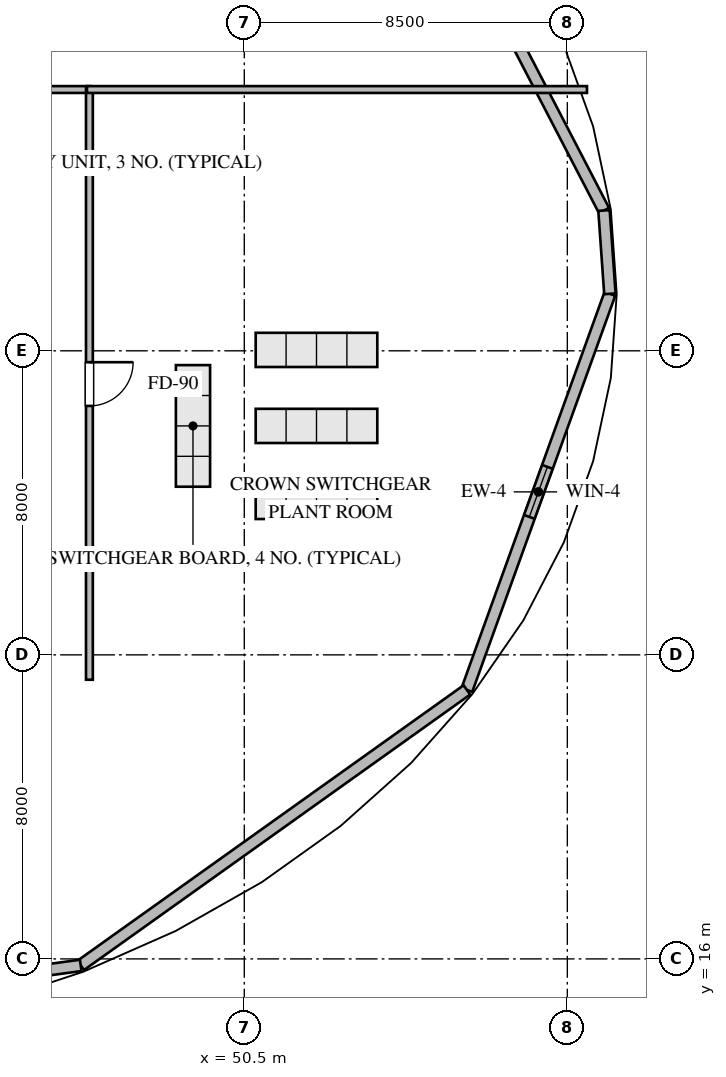
"""IFC4 building model, lengths in metres.
Left out: names, types, materials, properties, quantities, classifications, styles, units other than length and angle.
Written with IfcOpenShell. Run it as: python <this file> out.ifc"""

import sys

from ifc_helpers import new_model, si_unit, direction, frame, frame_2d, origin, place, context, subcontext, project, spatial, rectangle, extrude, element, fill, save


model = new_model("IFC4")
c1 = context("Model", 3, precision=1e-05, world=origin(), true_north=direction((0.0, 1.0)))
c2 = subcontext(c1, "Body", "Model", "MODEL_VIEW")
j1 = project(units=[si_unit("LENGTHUNIT", "METRE"), si_unit("PLANEANGLEUNIT", "RADIAN")], contexts=[c1])
p1 = place(None, origin())
s1 = spatial("IfcSite", under=j1, at=p1, CompositionType="ELEMENT")
p2 = place(p1, origin())
s2 = spatial("IfcBuilding", under=s1, at=p2, CompositionType="ELEMENT")
p3 = place(p2, frame((0.0, 0.0, 296.8)))
s3 = spatial("IfcBuildingStorey", under=s2, at=p3, CompositionType="ELEMENT", Elevation=296.8)
p4 = place(p3, frame((60.12, 33.5, 0.0), z_axis=(0.0, 0.0, 1.0), x_axis=(-0.339587618367, -0.940574425259, 0.0)))
e1 = element("IfcWall", 1, at=p4, inside=s3, PredefinedType="STANDARD", context=c2, shape_type="SweptSolid", body=[
    extrude(rectangle(XDim=11.082, YDim=0.3, at=frame_2d((5.541, 0.0))), origin(), (0.0, 0.0, 1.0), 3.72),
])
p5 = place(p4, frame((4.841, 0.0, 1.2)))
e2 = element("IfcOpeningElement", 2, at=p5, cuts=e1, PredefinedType="OPENING", context=c2, shape_type="SweptSolid", body=[
    extrude(rectangle(XDim=1.4, YDim=1.2, at=frame_2d((0.7, 0.6))), frame((0.0, 0.16, 0.0), z_axis=(0.0, -1.0, 0.0), x_axis=(1.0, 0.0, 0.0)), (0.0, 0.0, 1.0), 0.32),
])
p6 = place(p3, frame((56.357, 23.077, 0.0), z_axis=(0.0, 0.0, 1.0), x_axis=(-0.814111303181, -0.580708865123, 0.0)))
e3 = element("IfcWall", 3, at=p6, inside=s3, PredefinedType="STANDARD", context=c2, shape_type="SweptSolid", body=[
    extrude(rectangle(XDim=12.481, YDim=0.3, at=frame_2d((6.24, 0.0))), origin(), (0.0, 0.0, 1.0), 3.72),
])
p7 = place(p3, frame((46.196, 15.829, 0.0), z_axis=(0.0, 0.0, 1.0), x_axis=(-0.990927056791, -0.134400774248, 0.0)))
e4 = element("IfcWall", 4, at=p7, inside=s3, PredefinedType="STANDARD", context=c2, shape_type="SweptSolid", body=[
    extrude(rectangle(XDim=13.58, YDim=0.3, at=frame_2d((6.79, 0.0))), origin(), (0.0, 0.0, 1.0), 3.72),
])
p8 = place(p7, frame((6.09, 0.0, 1.2)))
e5 = element("IfcOpeningElement", 5, at=p8, cuts=e4, PredefinedType="OPENING", context=c2, shape_type="SweptSolid", body=[
    extrude(rectangle(XDim=1.4, YDim=1.2, at=frame_2d((0.7, 0.6))), frame((0.0, 0.16, 0.0), z_axis=(0.0, -1.0, 0.0), x_axis=(1.0, 0.0, 0.0)), (0.0, 0.0, 1.0), 0.32),
])
p9 = place(p3, frame((54.762, 45.718, 0.0), z_axis=(0.0, 0.0, 1.0), x_axis=(0.460623742834, -0.8875954977, 0.0)))
e6 = element("IfcWall", 6, at=p9, inside=s3, PredefinedType="STANDARD", context=c2, shape_type="SweptSolid", body=[
    extrude(rectangle(XDim=11.296, YDim=0.3, at=frame_2d((5.648, 0.0))), origin(), (0.0, 0.0, 1.0), 3.72),
])
p10 = place(p9, frame((4.948, 0.0, 1.2)))
e7 = element("IfcOpeningElement", 7, at=p10, cuts=e6, PredefinedType="OPENING", context=c2, shape_type="SweptSolid", body=[
    extrude(rectangle(XDim=1.4, YDim=1.2, at=frame_2d((0.7, 0.6))), frame((0.0, 0.16, 0.0), z_axis=(0.0, -1.0, 0.0), x_axis=(1.0, 0.0, 0.0)), (0.0, 0.0, 1.0), 0.32),
])
p11 = place(p3, frame((59.965, 35.692, 0.0), z_axis=(0.0, 0.0, 1.0), x_axis=(0.070552198309, -0.997508088846, 0.0)))
e8 = element("IfcWall", 8, at=p11, inside=s3, PredefinedType="STANDARD", context=c2, shape_type="SweptSolid", body=[
    extrude(rectangle(XDim=2.197, YDim=0.3, at=frame_2d((1.099, 0.0))), origin(), (0.0, 0.0, 1.0), 3.72),
])
p12 = place(p3, frame((34.435, 38.875, 0.0), z_axis=(0.0, 0.0, 1.0), x_axis=(1.0, 0.0, 0.0)))
e9 = element("IfcWall", 9, at=p12, inside=s3, PredefinedType="PARTITIONING", context=c2, shape_type="SweptSolid", body=[
    extrude(rectangle(XDim=12.02, YDim=0.18, at=frame_2d((6.01, 0.0))), origin(), (0.0, 0.0, 1.0), 3.72),
])
p13 = place(p12, frame((5.435, 0.0, 0.0)))
e10 = element("IfcOpeningElement", 10, at=p13, cuts=e9, PredefinedType="OPENING", context=c2, shape_type="SweptSolid", body=[
    extrude(rectangle(XDim=1.15, YDim=2.1, at=frame_2d((0.575, 1.05))), frame((0.0, 0.1, 0.0), z_axis=(0.0, -1.0, 0.0), x_axis=(1.0, 0.0, 0.0)), (0.0, 0.0, 1.0), 0.2),
])
p14 = place(p3, frame((46.425, 38.905, 0.0), z_axis=(0.0, 0.0, 1.0), x_axis=(0.0, -1.0, 0.0)))
e11 = element("IfcWall", 11, at=p14, inside=s3, PredefinedType="PARTITIONING", context=c2, shape_type="SweptSolid", body=[
    extrude(rectangle(XDim=15.56, YDim=0.18, at=frame_2d((7.78, 0.0))), origin(), (0.0, 0.0, 1.0), 3.72),
])
p15 = place(p14, frame((7.205, 0.0, 0.0)))
e12 = element("IfcOpeningElement", 12, at=p15, cuts=e11, PredefinedType="OPENING", context=c2, shape_type="SweptSolid", body=[
    extrude(rectangle(XDim=1.15, YDim=2.1, at=frame_2d((0.575, 1.05))), frame((0.0, 0.1, 0.0), z_axis=(0.0, -1.0, 0.0), x_axis=(1.0, 0.0, 0.0)), (0.0, 0.0, 1.0), 0.2),
])
p16 = place(p3, frame((59.517, 38.875, 0.0), z_axis=(0.0, 0.0, 1.0), x_axis=(-1.0, 0.0, 0.0)))
e13 = element("IfcWall", 13, at=p16, inside=s3, PredefinedType="PARTITIONING", context=c2, shape_type="SweptSolid", body=[
    extrude(rectangle(XDim=13.157, YDim=0.18, at=frame_2d((6.579, 0.0))), origin(), (0.0, 0.0, 1.0), 3.72),
])
p17 = place(p5, origin())
e14 = element("IfcWindow", 14, at=p17, inside=s3, PartitioningType="SINGLE_PANEL", PredefinedType="WINDOW", context=c2, shape_type="SweptSolid", body=[
    extrude(rectangle(XDim=1.4, YDim=1.2, at=frame_2d((0.7, 0.6))), frame((0.0, 0.03, 0.0), z_axis=(0.0, -1.0, 0.0), x_axis=(1.0, 0.0, 0.0)), (0.0, 0.0, 1.0), 0.06),
])
fill(e2, e14)
p18 = place(p15, origin())
e15 = element("IfcDoor", 15, at=p18, inside=s3, OperationType="SINGLE_SWING_LEFT", PredefinedType="DOOR", context=c2, shape_type="SweptSolid", body=[
    extrude(rectangle(XDim=1.15, YDim=2.1, at=frame_2d((0.575, 1.05))), frame((0.0, 0.025, 0.0), z_axis=(0.0, -1.0, 0.0), x_axis=(1.0, 0.0, 0.0)), (0.0, 0.0, 1.0), 0.05),
])
fill(e12, e15)
save(model, sys.argv[1])
